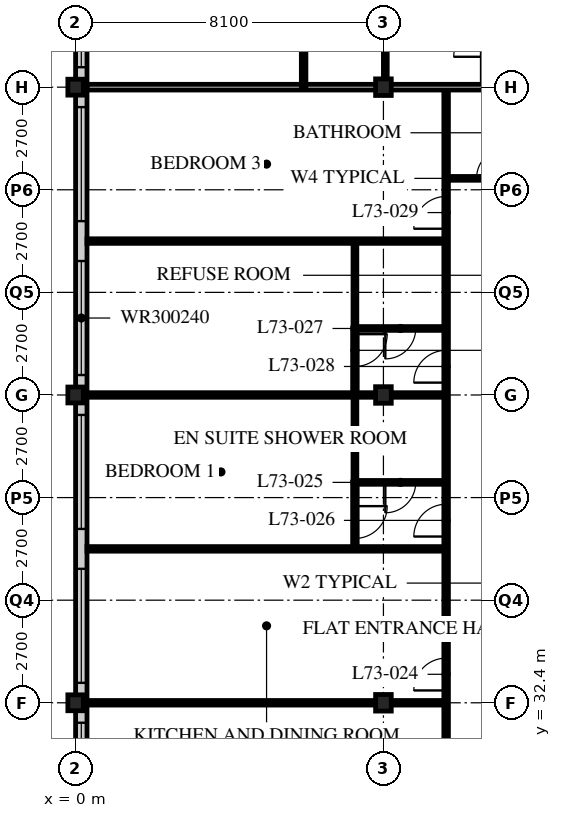
"""IFC4 building model, lengths in metres.
Left out: names, types, materials, properties, quantities, classifications, styles, units other than length and angle.
Written with IfcOpenShell. Run it as: python <this file> out.ifc"""

import sys

from ifc_helpers import new_model, si_unit, direction, frame, frame_2d, origin, origin_2d, place, context, subcontext, project, spatial, rectangle, i_section, extrude, element, fill, save


model = new_model("IFC4")
c1 = context("Model", 3, precision=1e-05, world=origin(), true_north=direction((0.0, 1.0)))
c2 = subcontext(c1, "Body", "Model", "MODEL_VIEW")
j1 = project(units=[si_unit("LENGTHUNIT", "METRE"), si_unit("PLANEANGLEUNIT", "RADIAN")], contexts=[c1])
p1 = place(None, origin())
s1 = spatial("IfcSite", under=j1, at=p1, CompositionType="ELEMENT")
p2 = place(p1, origin())
s2 = spatial("IfcBuilding", under=s1, at=p2, CompositionType="ELEMENT")
p3 = place(p2, frame((0.0, 0.0, 285.3)))
s3 = spatial("IfcBuildingStorey", under=s2, at=p3, CompositionType="ELEMENT", Elevation=285.3)
for number, where, z_axis, x_axis in (
    (1, (0.0, 32.4, 0.0), (0.0, 0.0, 1.0), (1.0, 0.0, 0.0)),
    (2, (0.0, 40.5, 0.0), (0.0, 0.0, 1.0), (1.0, 0.0, 0.0)),
    (3, (0.0, 48.6, 0.0), (0.0, 0.0, 1.0), (1.0, 0.0, 0.0)),
):
    element("IfcColumn", number, at=place(p3, frame(where, z_axis=z_axis, x_axis=x_axis)), inside=s3, PredefinedType="COLUMN", context=c2, shape_type="SweptSolid", body=[
        extrude(i_section(OverallWidth=0.407, OverallDepth=0.419, WebThickness=0.031, FlangeThickness=0.049, FilletRadius=0.015, at=origin_2d()), origin(), (0.0, 0.0, 1.0), 3.9),
    ])
for number, where, z_axis, x_axis in (
    (4, (8.1, 32.4, 0.0), (0.0, 0.0, 1.0), (1.0, 0.0, 0.0)),
    (5, (8.1, 40.5, 0.0), (0.0, 0.0, 1.0), (1.0, 0.0, 0.0)),
    (6, (8.1, 48.6, 0.0), (0.0, 0.0, 1.0), (1.0, 0.0, 0.0)),
):
    element("IfcColumn", number, at=place(p3, frame(where, z_axis=z_axis, x_axis=x_axis)), inside=s3, PredefinedType="COLUMN", context=c2, shape_type="SweptSolid", body=[
        extrude(i_section(OverallWidth=0.412, OverallDepth=0.437, WebThickness=0.036, FlangeThickness=0.058, FilletRadius=0.015, at=origin_2d()), origin(), (0.0, 0.0, 1.0), 3.9),
    ])
p4 = place(p3, frame((0.15, 56.4, 0.0), z_axis=(0.0, 0.0, 1.0), x_axis=(0.0, -1.0, 0.0)))
e7 = element("IfcWall", 7, at=p4, inside=s3, PredefinedType="SOLIDWALL", context=c2, shape_type="SweptSolid", body=[
    extrude(rectangle(XDim=32.1, YDim=0.3, at=frame_2d((16.05, 0.0))), origin(), (0.0, 0.0, 1.0), 3.69),
])
p5 = place(p4, frame((0.225, 0.0, 0.6)))
e8 = element("IfcOpeningElement", 8, at=p5, cuts=e7, PredefinedType="OPENING", context=c2, shape_type="SweptSolid", body=[
    extrude(rectangle(XDim=3.0, YDim=2.4, at=frame_2d((1.5, 1.2))), frame((0.0, 0.16, 0.0), z_axis=(0.0, -1.0, 0.0), x_axis=(1.0, 0.0, 0.0)), (0.0, 0.0, 1.0), 0.32),
])
p6 = place(p4, frame((4.275, 0.0, 0.6)))
e9 = element("IfcOpeningElement", 9, at=p6, cuts=e7, PredefinedType="OPENING", context=c2, shape_type="SweptSolid", body=[
    extrude(rectangle(XDim=3.0, YDim=2.4, at=frame_2d((1.5, 1.2))), frame((0.0, 0.16, 0.0), z_axis=(0.0, -1.0, 0.0), x_axis=(1.0, 0.0, 0.0)), (0.0, 0.0, 1.0), 0.32),
])
p7 = place(p4, frame((8.325, 0.0, 0.6)))
e10 = element("IfcOpeningElement", 10, at=p7, cuts=e7, PredefinedType="OPENING", context=c2, shape_type="SweptSolid", body=[
    extrude(rectangle(XDim=3.0, YDim=2.4, at=frame_2d((1.5, 1.2))), frame((0.0, 0.16, 0.0), z_axis=(0.0, -1.0, 0.0), x_axis=(1.0, 0.0, 0.0)), (0.0, 0.0, 1.0), 0.32),
])
p8 = place(p4, frame((12.375, 0.0, 0.6)))
e11 = element("IfcOpeningElement", 11, at=p8, cuts=e7, PredefinedType="OPENING", context=c2, shape_type="SweptSolid", body=[
    extrude(rectangle(XDim=3.0, YDim=2.4, at=frame_2d((1.5, 1.2))), frame((0.0, 0.16, 0.0), z_axis=(0.0, -1.0, 0.0), x_axis=(1.0, 0.0, 0.0)), (0.0, 0.0, 1.0), 0.32),
])
p9 = place(p4, frame((16.425, 0.0, 0.6)))
e12 = element("IfcOpeningElement", 12, at=p9, cuts=e7, PredefinedType="OPENING", context=c2, shape_type="SweptSolid", body=[
    extrude(rectangle(XDim=3.0, YDim=2.4, at=frame_2d((1.5, 1.2))), frame((0.0, 0.16, 0.0), z_axis=(0.0, -1.0, 0.0), x_axis=(1.0, 0.0, 0.0)), (0.0, 0.0, 1.0), 0.32),
])
p10 = place(p4, frame((20.475, 0.0, 0.6)))
e13 = element("IfcOpeningElement", 13, at=p10, cuts=e7, PredefinedType="OPENING", context=c2, shape_type="SweptSolid", body=[
    extrude(rectangle(XDim=3.0, YDim=2.4, at=frame_2d((1.5, 1.2))), frame((0.0, 0.16, 0.0), z_axis=(0.0, -1.0, 0.0), x_axis=(1.0, 0.0, 0.0)), (0.0, 0.0, 1.0), 0.32),
])
p11 = place(p4, frame((24.525, 0.0, 0.6)))
e14 = element("IfcOpeningElement", 14, at=p11, cuts=e7, PredefinedType="OPENING", context=c2, shape_type="SweptSolid", body=[
    extrude(rectangle(XDim=3.0, YDim=2.4, at=frame_2d((1.5, 1.2))), frame((0.0, 0.16, 0.0), z_axis=(0.0, -1.0, 0.0), x_axis=(1.0, 0.0, 0.0)), (0.0, 0.0, 1.0), 0.32),
])
p12 = place(p4, frame((28.575, 0.0, 0.6)))
e15 = element("IfcOpeningElement", 15, at=p12, cuts=e7, PredefinedType="OPENING", context=c2, shape_type="SweptSolid", body=[
    extrude(rectangle(XDim=3.0, YDim=2.4, at=frame_2d((1.5, 1.2))), frame((0.0, 0.16, 0.0), z_axis=(0.0, -1.0, 0.0), x_axis=(1.0, 0.0, 0.0)), (0.0, 0.0, 1.0), 0.32),
])
p13 = place(p3, frame((9.75, 22.5, 0.0), z_axis=(0.0, 0.0, 1.0), x_axis=(0.0, 1.0, 0.0)))
e16 = element("IfcWall", 16, at=p13, inside=s3, PredefinedType="PARTITIONING", context=c2, shape_type="SweptSolid", body=[
    extrude(rectangle(XDim=26.1, YDim=0.12, at=frame_2d((13.05, 0.0))), origin(), (0.0, 0.0, 1.0), 3.69),
])
p14 = place(p13, frame((0.975, 0.0, 0.0)))
e17 = element("IfcOpeningElement", 17, at=p14, cuts=e16, PredefinedType="OPENING", context=c2, shape_type="SweptSolid", body=[
    extrude(rectangle(XDim=0.85, YDim=2.1, at=frame_2d((0.425, 1.05))), frame((0.0, 0.07, 0.0), z_axis=(0.0, -1.0, 0.0), x_axis=(1.0, 0.0, 0.0)), (0.0, 0.0, 1.0), 0.14),
])
p15 = place(p13, frame((10.225, 0.0, 0.0)))
e18 = element("IfcOpeningElement", 18, at=p15, cuts=e16, PredefinedType="OPENING", context=c2, shape_type="SweptSolid", body=[
    extrude(rectangle(XDim=0.85, YDim=2.1, at=frame_2d((0.425, 1.05))), frame((0.0, 0.07, 0.0), z_axis=(0.0, -1.0, 0.0), x_axis=(1.0, 0.0, 0.0)), (0.0, 0.0, 1.0), 0.14),
])
p16 = place(p13, frame((14.275, 0.0, 0.0)))
e19 = element("IfcOpeningElement", 19, at=p16, cuts=e16, PredefinedType="OPENING", context=c2, shape_type="SweptSolid", body=[
    extrude(rectangle(XDim=0.85, YDim=2.1, at=frame_2d((0.425, 1.05))), frame((0.0, 0.07, 0.0), z_axis=(0.0, -1.0, 0.0), x_axis=(1.0, 0.0, 0.0)), (0.0, 0.0, 1.0), 0.14),
])
p17 = place(p13, frame((18.325, 0.0, 0.0)))
e20 = element("IfcOpeningElement", 20, at=p17, cuts=e16, PredefinedType="OPENING", context=c2, shape_type="SweptSolid", body=[
    extrude(rectangle(XDim=0.85, YDim=2.1, at=frame_2d((0.425, 1.05))), frame((0.0, 0.07, 0.0), z_axis=(0.0, -1.0, 0.0), x_axis=(1.0, 0.0, 0.0)), (0.0, 0.0, 1.0), 0.14),
])
p18 = place(p13, frame((22.375, 0.0, 0.0)))
e21 = element("IfcOpeningElement", 21, at=p18, cuts=e16, PredefinedType="OPENING", context=c2, shape_type="SweptSolid", body=[
    extrude(rectangle(XDim=0.85, YDim=2.1, at=frame_2d((0.425, 1.05))), frame((0.0, 0.07, 0.0), z_axis=(0.0, -1.0, 0.0), x_axis=(1.0, 0.0, 0.0)), (0.0, 0.0, 1.0), 0.14),
])
p19 = place(p3, frame((12.15, 46.2, 0.0), z_axis=(0.0, 0.0, 1.0), x_axis=(-1.0, 0.0, 0.0)))
e22 = element("IfcWall", 22, at=p19, inside=s3, PredefinedType="PARTITIONING", context=c2, shape_type="SweptSolid", body=[
    extrude(rectangle(XDim=2.4, YDim=0.1, at=frame_2d((1.2, 0.0))), origin(), (0.0, 0.0, 1.0), 3.69),
])
p20 = place(p19, frame((0.8, 0.0, 0.0)))
e23 = element("IfcOpeningElement", 23, at=p20, cuts=e22, PredefinedType="OPENING", context=c2, shape_type="SweptSolid", body=[
    extrude(rectangle(XDim=0.8, YDim=2.1, at=frame_2d((0.4, 1.05))), frame((0.0, 0.06, 0.0), z_axis=(0.0, -1.0, 0.0), x_axis=(1.0, 0.0, 0.0)), (0.0, 0.0, 1.0), 0.12),
])
p21 = place(p3, frame((9.75, 32.4, 0.0), z_axis=(0.0, 0.0, 1.0), x_axis=(-1.0, 0.0, 0.0)))
e24 = element("IfcWall", 24, at=p21, inside=s3, PredefinedType="PARTITIONING", context=c2, shape_type="SweptSolid", body=[
    extrude(rectangle(XDim=9.45, YDim=0.12, at=frame_2d((4.725, 0.0))), origin(), (0.0, 0.0, 1.0), 3.078),
])
p22 = place(p3, frame((9.75, 38.2, 0.0), z_axis=(0.0, 0.0, 1.0), x_axis=(-1.0, 0.0, 0.0)))
e25 = element("IfcWall", 25, at=p22, inside=s3, PredefinedType="PARTITIONING", context=c2, shape_type="SweptSolid", body=[
    extrude(rectangle(XDim=2.4, YDim=0.1, at=frame_2d((1.2, 0.0))), origin(), (0.0, 0.0, 1.0), 3.69),
])
p23 = place(p22, frame((0.8, 0.0, 0.0)))
e26 = element("IfcOpeningElement", 26, at=p23, cuts=e25, PredefinedType="OPENING", context=c2, shape_type="SweptSolid", body=[
    extrude(rectangle(XDim=0.8, YDim=2.1, at=frame_2d((0.4, 1.05))), frame((0.0, 0.06, 0.0), z_axis=(0.0, -1.0, 0.0), x_axis=(1.0, 0.0, 0.0)), (0.0, 0.0, 1.0), 0.12),
])
p24 = place(p3, frame((7.35, 38.2, 0.0), z_axis=(0.0, 0.0, 1.0), x_axis=(0.0, 1.0, 0.0)))
e27 = element("IfcWall", 27, at=p24, inside=s3, PredefinedType="PARTITIONING", context=c2, shape_type="SweptSolid", body=[
    extrude(rectangle(XDim=2.3, YDim=0.1, at=frame_2d((1.15, 0.0))), origin(), (0.0, 0.0, 1.0), 3.69),
])
p25 = place(p3, frame((9.75, 36.45, 0.0), z_axis=(0.0, 0.0, 1.0), x_axis=(-1.0, 0.0, 0.0)))
e28 = element("IfcWall", 28, at=p25, inside=s3, PredefinedType="PARTITIONING", context=c2, shape_type="SweptSolid", body=[
    extrude(rectangle(XDim=9.45, YDim=0.12, at=frame_2d((4.725, 0.0))), origin(), (0.0, 0.0, 1.0), 3.69),
])
p26 = place(p3, frame((9.75, 42.25, 0.0), z_axis=(0.0, 0.0, 1.0), x_axis=(-1.0, 0.0, 0.0)))
e29 = element("IfcWall", 29, at=p26, inside=s3, PredefinedType="PARTITIONING", context=c2, shape_type="SweptSolid", body=[
    extrude(rectangle(XDim=2.4, YDim=0.1, at=frame_2d((1.2, 0.0))), origin(), (0.0, 0.0, 1.0), 3.69),
])
p27 = place(p26, frame((0.8, 0.0, 0.0)))
e30 = element("IfcOpeningElement", 30, at=p27, cuts=e29, PredefinedType="OPENING", context=c2, shape_type="SweptSolid", body=[
    extrude(rectangle(XDim=0.8, YDim=2.1, at=frame_2d((0.4, 1.05))), frame((0.0, 0.06, 0.0), z_axis=(0.0, -1.0, 0.0), x_axis=(1.0, 0.0, 0.0)), (0.0, 0.0, 1.0), 0.12),
])
p28 = place(p3, frame((7.35, 42.25, 0.0), z_axis=(0.0, 0.0, 1.0), x_axis=(0.0, 1.0, 0.0)))
e31 = element("IfcWall", 31, at=p28, inside=s3, PredefinedType="PARTITIONING", context=c2, shape_type="SweptSolid", body=[
    extrude(rectangle(XDim=2.3, YDim=0.1, at=frame_2d((1.15, 0.0))), origin(), (0.0, 0.0, 1.0), 3.69),
])
p29 = place(p3, frame((9.75, 40.5, 0.0), z_axis=(0.0, 0.0, 1.0), x_axis=(-1.0, 0.0, 0.0)))
e32 = element("IfcWall", 32, at=p29, inside=s3, PredefinedType="PARTITIONING", context=c2, shape_type="SweptSolid", body=[
    extrude(rectangle(XDim=9.45, YDim=0.12, at=frame_2d((4.725, 0.0))), origin(), (0.0, 0.0, 1.0), 3.078),
])
p30 = place(p3, frame((9.75, 44.55, 0.0), z_axis=(0.0, 0.0, 1.0), x_axis=(-1.0, 0.0, 0.0)))
e33 = element("IfcWall", 33, at=p30, inside=s3, PredefinedType="PARTITIONING", context=c2, shape_type="SweptSolid", body=[
    extrude(rectangle(XDim=9.45, YDim=0.12, at=frame_2d((4.725, 0.0))), origin(), (0.0, 0.0, 1.0), 3.69),
])
p31 = place(p3, frame((8.15, 48.6, 0.0), z_axis=(0.0, 0.0, 1.0), x_axis=(0.0, 1.0, 0.0)))
e34 = element("IfcWall", 34, at=p31, inside=s3, PredefinedType="PARTITIONING", context=c2, shape_type="SweptSolid", body=[
    extrude(rectangle(XDim=2.4, YDim=0.1, at=frame_2d((1.2, 0.0))), origin(), (0.0, 0.0, 1.0), 3.078),
])
p32 = place(p3, frame((0.3, 48.6, 0.0), z_axis=(0.0, 0.0, 1.0), x_axis=(1.0, 0.0, 0.0)))
e35 = element("IfcWall", 35, at=p32, inside=s3, PredefinedType="PARTITIONING", context=c2, shape_type="SweptSolid", body=[
    extrude(rectangle(XDim=11.85, YDim=0.15, at=frame_2d((5.925, 0.0))), origin(), (0.0, 0.0, 1.0), 3.078),
])
p33 = place(p3, frame((7.35, 36.45, 0.0), z_axis=(0.0, 0.0, 1.0), x_axis=(0.0, 1.0, 0.0)))
e36 = element("IfcWall", 36, at=p33, inside=s3, PredefinedType="PARTITIONING", context=c2, shape_type="SweptSolid", body=[
    extrude(rectangle(XDim=1.76, YDim=0.12, at=frame_2d((0.88, 0.0))), origin(), (0.0, 0.0, 1.0), 3.69),
])
p34 = place(p33, frame((0.275, 0.0, 0.0)))
e37 = element("IfcOpeningElement", 37, at=p34, cuts=e36, PredefinedType="OPENING", context=c2, shape_type="SweptSolid", body=[
    extrude(rectangle(XDim=0.85, YDim=2.1, at=frame_2d((0.425, 1.05))), frame((0.0, 0.07, 0.0), z_axis=(0.0, -1.0, 0.0), x_axis=(1.0, 0.0, 0.0)), (0.0, 0.0, 1.0), 0.14),
])
p35 = place(p3, frame((7.35, 40.5, 0.0), z_axis=(0.0, 0.0, 1.0), x_axis=(0.0, 1.0, 0.0)))
e38 = element("IfcWall", 38, at=p35, inside=s3, PredefinedType="PARTITIONING", context=c2, shape_type="SweptSolid", body=[
    extrude(rectangle(XDim=1.76, YDim=0.12, at=frame_2d((0.88, 0.0))), origin(), (0.0, 0.0, 1.0), 3.69),
])
p36 = place(p35, frame((0.75, 0.0, 0.0)))
e39 = element("IfcOpeningElement", 39, at=p36, cuts=e38, PredefinedType="OPENING", context=c2, shape_type="SweptSolid", body=[
    extrude(rectangle(XDim=0.85, YDim=2.1, at=frame_2d((0.425, 1.05))), frame((0.0, 0.07, 0.0), z_axis=(0.0, -1.0, 0.0), x_axis=(1.0, 0.0, 0.0)), (0.0, 0.0, 1.0), 0.14),
])
p37 = place(p3, frame((6.0, 48.6, 0.0), z_axis=(0.0, 0.0, 1.0), x_axis=(0.0, 1.0, 0.0)))
e40 = element("IfcWall", 40, at=p37, inside=s3, PredefinedType="PARTITIONING", context=c2, shape_type="SweptSolid", body=[
    extrude(rectangle(XDim=11.85, YDim=0.12, at=frame_2d((5.925, 0.0))), origin(), (0.0, 0.0, 1.0), 3.69),
])
p38 = place(p37, frame((5.5, 0.0, 0.0)))
e41 = element("IfcOpeningElement", 41, at=p38, cuts=e40, PredefinedType="OPENING", context=c2, shape_type="SweptSolid", body=[
    extrude(rectangle(XDim=0.85, YDim=2.1, at=frame_2d((0.425, 1.05))), frame((0.0, 0.07, 0.0), z_axis=(0.0, -1.0, 0.0), x_axis=(1.0, 0.0, 0.0)), (0.0, 0.0, 1.0), 0.14),
])
p39 = place(p6, origin())
e42 = element("IfcWindow", 42, at=p39, inside=s3, PartitioningType="SINGLE_PANEL", PredefinedType="WINDOW", context=c2, shape_type="SweptSolid", body=[
    extrude(rectangle(XDim=3.0, YDim=2.4, at=frame_2d((1.5, 1.2))), frame((0.0, 0.03, 0.0), z_axis=(0.0, -1.0, 0.0), x_axis=(1.0, 0.0, 0.0)), (0.0, 0.0, 1.0), 0.06),
])
fill(e9, e42)
p40 = place(p7, origin())
e43 = element("IfcWindow", 43, at=p40, inside=s3, PartitioningType="SINGLE_PANEL", PredefinedType="WINDOW", context=c2, shape_type="SweptSolid", body=[
    extrude(rectangle(XDim=3.0, YDim=2.4, at=frame_2d((1.5, 1.2))), frame((0.0, 0.03, 0.0), z_axis=(0.0, -1.0, 0.0), x_axis=(1.0, 0.0, 0.0)), (0.0, 0.0, 1.0), 0.06),
])
fill(e10, e43)
p41 = place(p8, origin())
e44 = element("IfcWindow", 44, at=p41, inside=s3, PartitioningType="SINGLE_PANEL", PredefinedType="WINDOW", context=c2, shape_type="SweptSolid", body=[
    extrude(rectangle(XDim=3.0, YDim=2.4, at=frame_2d((1.5, 1.2))), frame((0.0, 0.03, 0.0), z_axis=(0.0, -1.0, 0.0), x_axis=(1.0, 0.0, 0.0)), (0.0, 0.0, 1.0), 0.06),
])
fill(e11, e44)
p42 = place(p9, origin())
e45 = element("IfcWindow", 45, at=p42, inside=s3, PartitioningType="SINGLE_PANEL", PredefinedType="WINDOW", context=c2, shape_type="SweptSolid", body=[
    extrude(rectangle(XDim=3.0, YDim=2.4, at=frame_2d((1.5, 1.2))), frame((0.0, 0.03, 0.0), z_axis=(0.0, -1.0, 0.0), x_axis=(1.0, 0.0, 0.0)), (0.0, 0.0, 1.0), 0.06),
])
fill(e12, e45)
p43 = place(p10, origin())
e46 = element("IfcWindow", 46, at=p43, inside=s3, PartitioningType="SINGLE_PANEL", PredefinedType="WINDOW", context=c2, shape_type="SweptSolid", body=[
    extrude(rectangle(XDim=3.0, YDim=2.4, at=frame_2d((1.5, 1.2))), frame((0.0, 0.03, 0.0), z_axis=(0.0, -1.0, 0.0), x_axis=(1.0, 0.0, 0.0)), (0.0, 0.0, 1.0), 0.06),
])
fill(e13, e46)
p44 = place(p11, origin())
e47 = element("IfcWindow", 47, at=p44, inside=s3, PartitioningType="SINGLE_PANEL", PredefinedType="WINDOW", context=c2, shape_type="SweptSolid", body=[
    extrude(rectangle(XDim=3.0, YDim=2.4, at=frame_2d((1.5, 1.2))), frame((0.0, 0.03, 0.0), z_axis=(0.0, -1.0, 0.0), x_axis=(1.0, 0.0, 0.0)), (0.0, 0.0, 1.0), 0.06),
])
fill(e14, e47)
p45 = place(p20, origin())
e48 = element("IfcDoor", 48, at=p45, inside=s3, OperationType="SINGLE_SWING_RIGHT", PredefinedType="DOOR", context=c2, shape_type="SweptSolid", body=[
    extrude(rectangle(XDim=0.8, YDim=2.1, at=frame_2d((0.4, 1.05))), frame((0.0, 0.025, 0.0), z_axis=(0.0, -1.0, 0.0), x_axis=(1.0, 0.0, 0.0)), (0.0, 0.0, 1.0), 0.05),
])
fill(e23, e48)
p46 = place(p15, origin())
e49 = element("IfcDoor", 49, at=p46, inside=s3, OperationType="SINGLE_SWING_LEFT", PredefinedType="DOOR", context=c2, shape_type="SweptSolid", body=[
    extrude(rectangle(XDim=0.85, YDim=2.1, at=frame_2d((0.425, 1.05))), frame((0.0, 0.025, 0.0), z_axis=(0.0, -1.0, 0.0), x_axis=(1.0, 0.0, 0.0)), (0.0, 0.0, 1.0), 0.05),
])
fill(e18, e49)
p47 = place(p23, origin())
e50 = element("IfcDoor", 50, at=p47, inside=s3, OperationType="SINGLE_SWING_RIGHT", PredefinedType="DOOR", context=c2, shape_type="SweptSolid", body=[
    extrude(rectangle(XDim=0.8, YDim=2.1, at=frame_2d((0.4, 1.05))), frame((0.0, 0.025, 0.0), z_axis=(0.0, -1.0, 0.0), x_axis=(1.0, 0.0, 0.0)), (0.0, 0.0, 1.0), 0.05),
])
fill(e26, e50)
p48 = place(p16, origin())
e51 = element("IfcDoor", 51, at=p48, inside=s3, OperationType="SINGLE_SWING_LEFT", PredefinedType="DOOR", context=c2, shape_type="SweptSolid", body=[
    extrude(rectangle(XDim=0.85, YDim=2.1, at=frame_2d((0.425, 1.05))), frame((0.0, 0.025, 0.0), z_axis=(0.0, -1.0, 0.0), x_axis=(1.0, 0.0, 0.0)), (0.0, 0.0, 1.0), 0.05),
])
fill(e19, e51)
p49 = place(p27, origin())
e52 = element("IfcDoor", 52, at=p49, inside=s3, OperationType="SINGLE_SWING_RIGHT", PredefinedType="DOOR", context=c2, shape_type="SweptSolid", body=[
    extrude(rectangle(XDim=0.8, YDim=2.1, at=frame_2d((0.4, 1.05))), frame((0.0, 0.025, 0.0), z_axis=(0.0, -1.0, 0.0), x_axis=(1.0, 0.0, 0.0)), (0.0, 0.0, 1.0), 0.05),
])
fill(e30, e52)
p50 = place(p17, origin())
e53 = element("IfcDoor", 53, at=p50, inside=s3, OperationType="SINGLE_SWING_LEFT", PredefinedType="DOOR", context=c2, shape_type="SweptSolid", body=[
    extrude(rectangle(XDim=0.85, YDim=2.1, at=frame_2d((0.425, 1.05))), frame((0.0, 0.025, 0.0), z_axis=(0.0, -1.0, 0.0), x_axis=(1.0, 0.0, 0.0)), (0.0, 0.0, 1.0), 0.05),
])
fill(e20, e53)
p51 = place(p18, origin())
e54 = element("IfcDoor", 54, at=p51, inside=s3, OperationType="SINGLE_SWING_LEFT", PredefinedType="DOOR", context=c2, shape_type="SweptSolid", body=[
    extrude(rectangle(XDim=0.85, YDim=2.1, at=frame_2d((0.425, 1.05))), frame((0.0, 0.025, 0.0), z_axis=(0.0, -1.0, 0.0), x_axis=(1.0, 0.0, 0.0)), (0.0, 0.0, 1.0), 0.05),
])
fill(e21, e54)
p52 = place(p34, origin())
e55 = element("IfcDoor", 55, at=p52, inside=s3, OperationType="SINGLE_SWING_LEFT", PredefinedType="DOOR", context=c2, shape_type="SweptSolid", body=[
    extrude(rectangle(XDim=0.85, YDim=2.1, at=frame_2d((0.425, 1.05))), frame((0.0, 0.025, 0.0), z_axis=(0.0, -1.0, 0.0), x_axis=(1.0, 0.0, 0.0)), (0.0, 0.0, 1.0), 0.05),
])
fill(e37, e55)
p53 = place(p36, origin())
e56 = element("IfcDoor", 56, at=p53, inside=s3, OperationType="SINGLE_SWING_LEFT", PredefinedType="DOOR", context=c2, shape_type="SweptSolid", body=[
    extrude(rectangle(XDim=0.85, YDim=2.1, at=frame_2d((0.425, 1.05))), frame((0.0, 0.025, 0.0), z_axis=(0.0, -1.0, 0.0), x_axis=(1.0, 0.0, 0.0)), (0.0, 0.0, 1.0), 0.05),
])
fill(e39, e56)
save(model, sys.argv[1])
